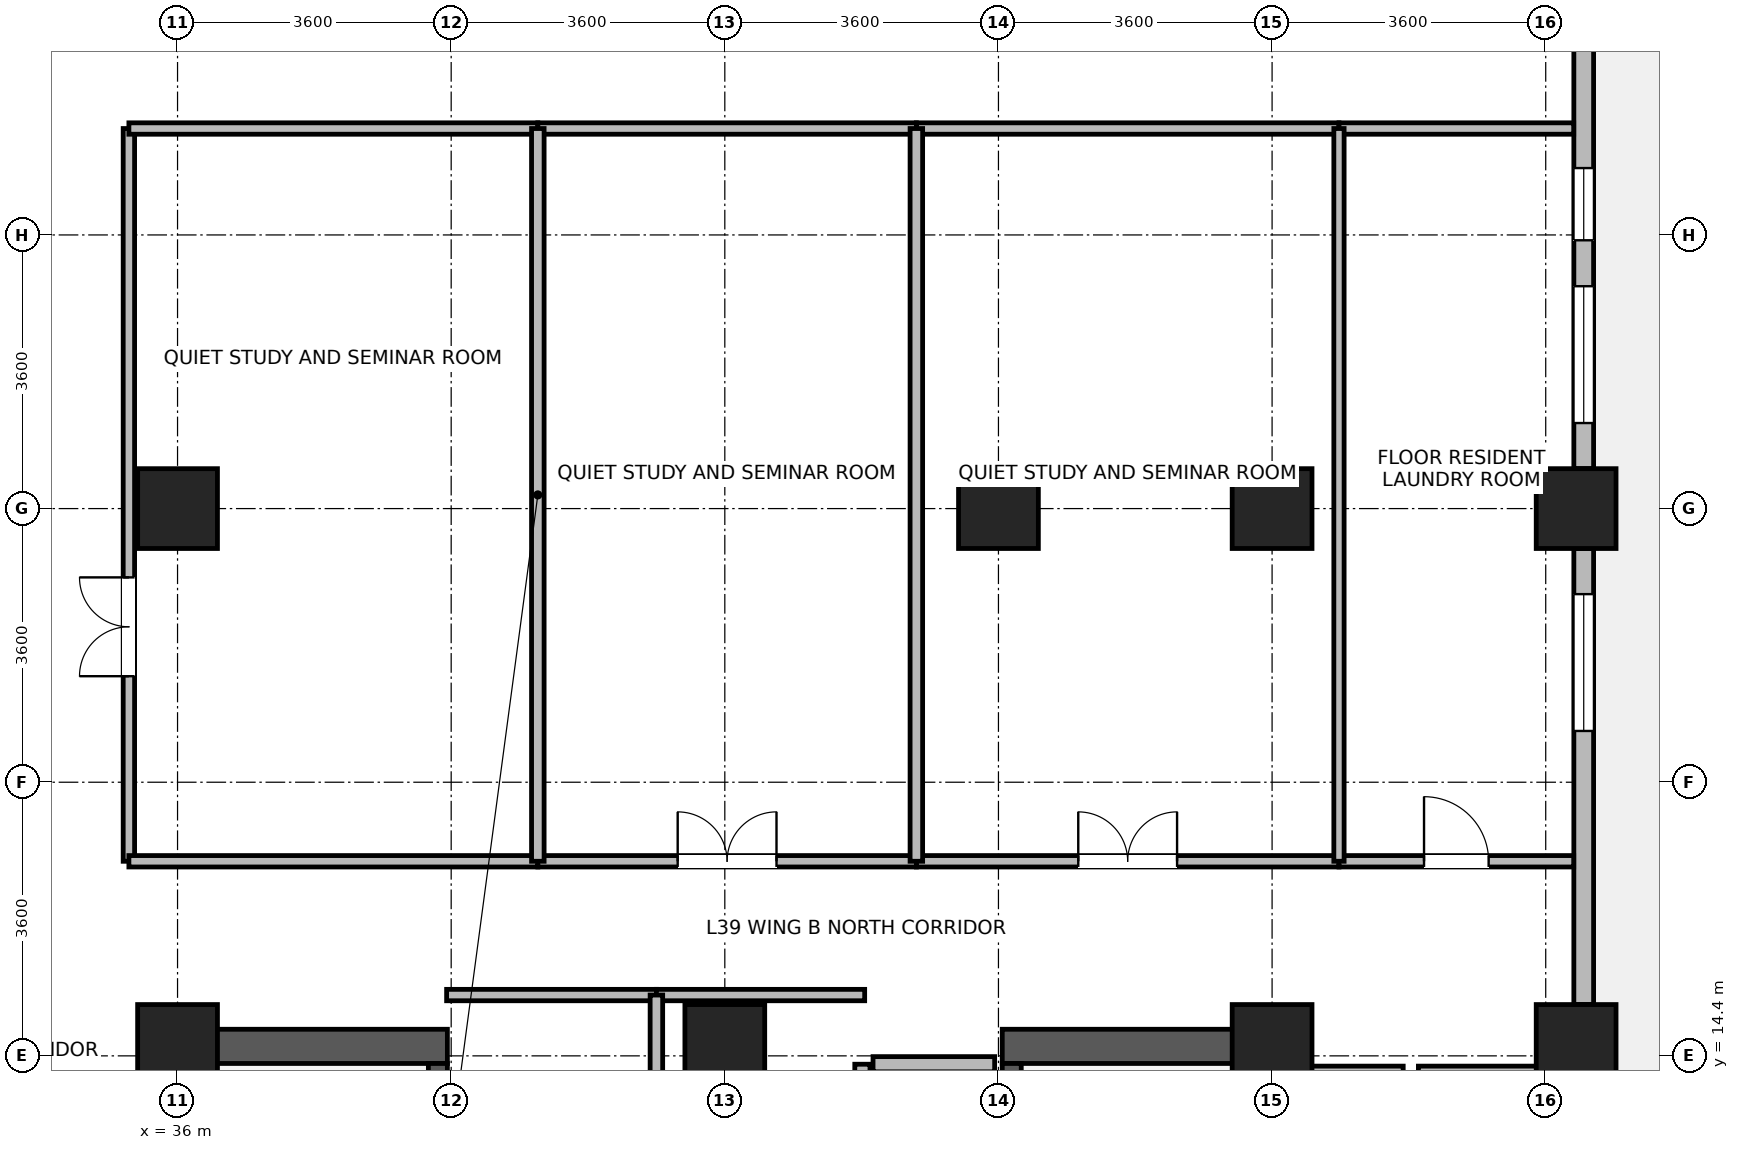
"""IFC4 building model, lengths in metres.
Left out: names, types, materials, properties, quantities, classifications, styles, units other than length and angle.
Written with IfcOpenShell. Run it as: python <this file> out.ifc"""

import sys

from ifc_helpers import new_model, si_unit, direction, frame, frame_2d, origin, origin_2d, place, context, subcontext, project, spatial, rectangle, extrude, source, transform, mapped, element, fill, save


model = new_model("IFC4")
c1 = context("Model", 3, precision=1e-05, world=origin(), true_north=direction((0.0, 1.0)))
c2 = subcontext(c1, "Body", "Model", "MODEL_VIEW")
j1 = project(units=[si_unit("LENGTHUNIT", "METRE"), si_unit("PLANEANGLEUNIT", "RADIAN")], contexts=[c1])
p1 = place(None, origin())
s1 = spatial("IfcSite", under=j1, at=p1, CompositionType="ELEMENT")
p2 = place(p1, origin())
s2 = spatial("IfcBuilding", under=s1, at=p2, CompositionType="ELEMENT")
p3 = place(p2, frame((0.0, 0.0, 155.0)))
s3 = spatial("IfcBuildingStorey", under=s2, at=p3, CompositionType="ELEMENT", Elevation=155.0)
for number, where, z_axis, x_axis in (
    (1, (36.125, 6.85, 0.0), (0.0, 0.0, 1.0), (0.0, 1.0, 0.0)),
    (2, (50.275, 6.85, 0.0), (0.0, 0.0, 1.0), (0.0, 1.0, 0.0)),
):
    element("IfcWall", number, at=place(p3, frame(where, z_axis=z_axis, x_axis=x_axis)), inside=s3, PredefinedType="SHEAR", context=c2, shape_type="SweptSolid", body=[
        extrude(rectangle(XDim=7.9, YDim=0.45, at=frame_2d((3.95, 0.0))), origin(), (0.0, 0.0, 1.0), 3.46),
    ])
for number, where, z_axis, x_axis in (
    (3, (36.35, 14.525, 0.0), (0.0, 0.0, 1.0), (1.0, 0.0, 0.0)),
    (4, (46.85, 14.525, 0.0), (0.0, 0.0, 1.0), (1.0, 0.0, 0.0)),
):
    element("IfcWall", number, at=place(p3, frame(where, z_axis=z_axis, x_axis=x_axis)), inside=s3, PredefinedType="SHEAR", context=c2, shape_type="SweptSolid", body=[
        extrude(rectangle(XDim=3.2, YDim=0.45, at=frame_2d((1.6, 0.0))), origin(), (0.0, 0.0, 1.0), 3.46),
    ])
p4 = place(p3, frame((39.425, 7.3, 0.0), z_axis=(0.0, 0.0, 1.0), x_axis=(0.0, 1.0, 0.0)))
e5 = element("IfcWall", 5, at=p4, inside=s3, PredefinedType="SHEAR", context=c2, shape_type="SweptSolid", body=[
    extrude(rectangle(XDim=7.0, YDim=0.25, at=frame_2d((3.5, 0.0))), origin(), (0.0, 0.0, 1.0), 3.46),
])
p5 = place(p4, frame((0.15, 0.0, 0.0)))
e6 = element("IfcOpeningElement", 6, at=p5, cuts=e5, PredefinedType="OPENING", context=c2, shape_type="SweptSolid", body=[
    extrude(rectangle(XDim=1.1, YDim=2.08, at=frame_2d((0.55, 1.04))), frame((0.0, 0.135, 0.0), z_axis=(0.0, -1.0, 0.0), x_axis=(1.0, 0.0, 0.0)), (0.0, 0.0, 1.0), 0.27),
])
p6 = place(p3, frame((46.975, 7.3, 0.0), z_axis=(0.0, 0.0, 1.0), x_axis=(0.0, 1.0, 0.0)))
e7 = element("IfcWall", 7, at=p6, inside=s3, PredefinedType="SHEAR", context=c2, shape_type="SweptSolid", body=[
    extrude(rectangle(XDim=7.0, YDim=0.25, at=frame_2d((3.5, 0.0))), origin(), (0.0, 0.0, 1.0), 3.46),
])
p7 = place(p6, frame((0.15, 0.0, 0.0)))
e8 = element("IfcOpeningElement", 8, at=p7, cuts=e7, PredefinedType="OPENING", context=c2, shape_type="SweptSolid", body=[
    extrude(rectangle(XDim=1.1, YDim=2.08, at=frame_2d((0.55, 1.04))), frame((0.0, 0.135, 0.0), z_axis=(0.0, -1.0, 0.0), x_axis=(1.0, 0.0, 0.0)), (0.0, 0.0, 1.0), 0.27),
])
m1 = source(origin(), c2, "Body", "SweptSolid", [
    extrude(rectangle(XDim=1.05, YDim=1.05, at=origin_2d()), origin(), (0.0, 0.0, 1.0), 3.7),
])
for number, where, z_axis, x_axis in (
    (9, (36.0, 21.6, 0.0), (0.0, 0.0, 1.0), (1.0, 0.0, 0.0)),
    (10, (46.8, 21.6, 0.0), (0.0, 0.0, 1.0), (1.0, 0.0, 0.0)),
    (11, (36.0, 14.55, 0.0), (0.0, 0.0, 1.0), (1.0, 0.0, 0.0)),
    (12, (43.2, 14.55, 0.0), (0.0, 0.0, 1.0), (1.0, 0.0, 0.0)),
    (13, (50.4, 14.55, 0.0), (0.0, 0.0, 1.0), (1.0, 0.0, 0.0)),
    (14, (50.4, 21.6, 0.0), (0.0, 0.0, 1.0), (1.0, 0.0, 0.0)),
    (15, (54.4, 14.55, 0.0), (0.0, 0.0, 1.0), (1.0, 0.0, 0.0)),
    (16, (54.4, 21.6, 0.0), (0.0, 0.0, 1.0), (1.0, 0.0, 0.0)),
):
    element("IfcColumn", number, at=place(p3, frame(where, z_axis=z_axis, x_axis=x_axis)), inside=s3, PredefinedType="COLUMN", context=c2, shape_type="MappedRepresentation", body=[
        mapped(m1, transform((0.0, 0.0, 0.0), x_axis=(1.0, 0.0, 0.0), y_axis=(0.0, 1.0, 0.0), z_axis=(0.0, 0.0, 1.0), scale=1.0)),
    ])
p8 = place(p3, frame((54.5, 21.074, 0.0), z_axis=(0.0, 0.0, 1.0), x_axis=(0.0, -1.0, 0.0)))
e17 = element("IfcWall", 17, at=p8, inside=s3, PredefinedType="STANDARD", context=c2, shape_type="SweptSolid", body=[
    extrude(rectangle(XDim=5.998, YDim=0.26, at=frame_2d((2.999, 0.0))), origin(), (0.0, 0.0, 1.0), 2.99),
])
p9 = place(p8, frame((0.6, 0.0, 0.85)))
e18 = element("IfcOpeningElement", 18, at=p9, cuts=e17, PredefinedType="OPENING", context=c2, shape_type="SweptSolid", body=[
    extrude(rectangle(XDim=1.8, YDim=1.85, at=frame_2d((0.9, 0.925))), frame((0.0, 0.14, 0.0), z_axis=(0.0, -1.0, 0.0), x_axis=(1.0, 0.0, 0.0)), (0.0, 0.0, 1.0), 0.28),
])
p10 = place(p3, frame((54.5, 28.124, 0.0), z_axis=(0.0, 0.0, 1.0), x_axis=(0.0, -1.0, 0.0)))
e19 = element("IfcWall", 19, at=p10, inside=s3, PredefinedType="STANDARD", context=c2, shape_type="SweptSolid", body=[
    extrude(rectangle(XDim=5.998, YDim=0.26, at=frame_2d((2.999, 0.0))), origin(), (0.0, 0.0, 1.0), 2.99),
])
p11 = place(p10, frame((3.598, 0.0, 0.85)))
e20 = element("IfcOpeningElement", 20, at=p11, cuts=e19, PredefinedType="OPENING", context=c2, shape_type="SweptSolid", body=[
    extrude(rectangle(XDim=1.8, YDim=1.85, at=frame_2d((0.9, 0.925))), frame((0.0, 0.14, 0.0), z_axis=(0.0, -1.0, 0.0), x_axis=(1.0, 0.0, 0.0)), (0.0, 0.0, 1.0), 0.28),
])
p12 = place(p10, frame((2.044, 0.0, 0.85)))
e21 = element("IfcOpeningElement", 21, at=p12, cuts=e19, PredefinedType="OPENING", context=c2, shape_type="SweptSolid", body=[
    extrude(rectangle(XDim=0.95, YDim=1.75, at=frame_2d((0.475, 0.875))), frame((0.0, 0.14, 0.0), z_axis=(0.0, -1.0, 0.0), x_axis=(1.0, 0.0, 0.0)), (0.0, 0.0, 1.0), 0.28),
])
p13 = place(p3, frame((50.475, 14.165, 0.0), z_axis=(0.0, 0.0, 1.0), x_axis=(1.0, 0.0, 0.0)))
e22 = element("IfcWall", 22, at=p13, inside=s3, PredefinedType="PARTITIONING", context=c2, shape_type="SweptSolid", body=[
    extrude(rectangle(XDim=1.65, YDim=0.2, at=frame_2d((0.825, 0.0))), origin(), (0.0, 0.0, 1.0), 3.44),
])
p14 = place(p3, frame((52.325, 14.165, 0.0), z_axis=(0.0, 0.0, 1.0), x_axis=(1.0, 0.0, 0.0)))
e23 = element("IfcWall", 23, at=p14, inside=s3, PredefinedType="PARTITIONING", context=c2, shape_type="SweptSolid", body=[
    extrude(rectangle(XDim=1.65, YDim=0.2, at=frame_2d((0.825, 0.0))), origin(), (0.0, 0.0, 1.0), 3.44),
])
p15 = place(p3, frame((45.15, 14.29, 0.0), z_axis=(0.0, 0.0, 1.0), x_axis=(1.0, 0.0, 0.0)))
e24 = element("IfcWall", 24, at=p15, inside=s3, PredefinedType="PARTITIONING", context=c2, shape_type="SweptSolid", body=[
    extrude(rectangle(XDim=1.6, YDim=0.2, at=frame_2d((0.8, 0.0))), origin(), (0.0, 0.0, 1.0), 2.44),
])
p16 = place(p3, frame((45.01, 11.61, 0.0), z_axis=(0.0, 0.0, 1.0), x_axis=(0.0, 1.0, 0.0)))
e25 = element("IfcWall", 25, at=p16, inside=s3, PredefinedType="PARTITIONING", context=c2, shape_type="SweptSolid", body=[
    extrude(rectangle(XDim=2.68, YDim=0.2, at=frame_2d((1.34, 0.0))), origin(), (0.0, 0.0, 1.0), 3.44),
])
p17 = place(p3, frame((35.36, 16.96, 0.0), z_axis=(0.0, 0.0, 1.0), x_axis=(0.0, 1.0, 0.0)))
e26 = element("IfcWall", 26, at=p17, inside=s3, PredefinedType="PARTITIONING", context=c2, shape_type="SweptSolid", body=[
    extrude(rectangle(XDim=9.64, YDim=0.15, at=frame_2d((4.82, 0.0))), origin(), (0.0, 0.0, 1.0), 3.44),
])
p18 = place(p17, frame((2.435, 0.0, 0.0)))
e27 = element("IfcOpeningElement", 27, at=p18, cuts=e26, PredefinedType="OPENING", context=c2, shape_type="SweptSolid", body=[
    extrude(rectangle(XDim=1.3, YDim=2.12, at=frame_2d((0.65, 1.06))), frame((0.0, 0.085, 0.0), z_axis=(0.0, -1.0, 0.0), x_axis=(1.0, 0.0, 0.0)), (0.0, 0.0, 1.0), 0.17),
])
p19 = place(p3, frame((45.72, 16.96, 0.0), z_axis=(0.0, 0.0, 1.0), x_axis=(1.0, 0.0, 0.0)))
e28 = element("IfcWall", 28, at=p19, inside=s3, PredefinedType="PARTITIONING", context=c2, shape_type="SweptSolid", body=[
    extrude(rectangle(XDim=5.56, YDim=0.15, at=frame_2d((2.78, 0.0))), origin(), (0.0, 0.0, 1.0), 3.44),
])
p20 = place(p19, frame((2.13, 0.0, 0.0)))
e29 = element("IfcOpeningElement", 29, at=p20, cuts=e28, PredefinedType="OPENING", context=c2, shape_type="SweptSolid", body=[
    extrude(rectangle(XDim=1.3, YDim=2.12, at=frame_2d((0.65, 1.06))), frame((0.0, 0.085, 0.0), z_axis=(0.0, -1.0, 0.0), x_axis=(1.0, 0.0, 0.0)), (0.0, 0.0, 1.0), 0.17),
])
p21 = place(p3, frame((45.72, 26.6, 0.0), z_axis=(0.0, 0.0, 1.0), x_axis=(1.0, 0.0, 0.0)))
e30 = element("IfcWall", 30, at=p21, inside=s3, PredefinedType="PARTITIONING", context=c2, shape_type="SweptSolid", body=[
    extrude(rectangle(XDim=5.56, YDim=0.15, at=frame_2d((2.78, 0.0))), origin(), (0.0, 0.0, 1.0), 3.44),
])
for number, where, z_axis, x_axis in (
    (31, (35.36, 16.96, 0.0), (0.0, 0.0, 1.0), (1.0, 0.0, 0.0)),
    (32, (35.36, 26.6, 0.0), (0.0, 0.0, 1.0), (1.0, 0.0, 0.0)),
):
    element("IfcWall", number, at=place(p3, frame(where, z_axis=z_axis, x_axis=x_axis)), inside=s3, PredefinedType="PARTITIONING", context=c2, shape_type="SweptSolid", body=[
        extrude(rectangle(XDim=5.38, YDim=0.15, at=frame_2d((2.69, 0.0))), origin(), (0.0, 0.0, 1.0), 3.44),
    ])
p22 = place(p3, frame((40.74, 16.96, 0.0), z_axis=(0.0, 0.0, 1.0), x_axis=(1.0, 0.0, 0.0)))
e33 = element("IfcWall", 33, at=p22, inside=s3, PredefinedType="PARTITIONING", context=c2, shape_type="SweptSolid", body=[
    extrude(rectangle(XDim=4.98, YDim=0.15, at=frame_2d((2.49, 0.0))), origin(), (0.0, 0.0, 1.0), 3.44),
])
p23 = place(p22, frame((1.84, 0.0, 0.0)))
e34 = element("IfcOpeningElement", 34, at=p23, cuts=e33, PredefinedType="OPENING", context=c2, shape_type="SweptSolid", body=[
    extrude(rectangle(XDim=1.3, YDim=2.12, at=frame_2d((0.65, 1.06))), frame((0.0, 0.085, 0.0), z_axis=(0.0, -1.0, 0.0), x_axis=(1.0, 0.0, 0.0)), (0.0, 0.0, 1.0), 0.17),
])
p24 = place(p3, frame((40.74, 26.6, 0.0), z_axis=(0.0, 0.0, 1.0), x_axis=(1.0, 0.0, 0.0)))
e35 = element("IfcWall", 35, at=p24, inside=s3, PredefinedType="PARTITIONING", context=c2, shape_type="SweptSolid", body=[
    extrude(rectangle(XDim=4.98, YDim=0.15, at=frame_2d((2.49, 0.0))), origin(), (0.0, 0.0, 1.0), 3.44),
])
p25 = place(p3, frame((51.28, 16.96, 0.0), z_axis=(0.0, 0.0, 1.0), x_axis=(1.0, 0.0, 0.0)))
e36 = element("IfcWall", 36, at=p25, inside=s3, PredefinedType="PARTITIONING", context=c2, shape_type="SweptSolid", body=[
    extrude(rectangle(XDim=3.088, YDim=0.15, at=frame_2d((1.544, 0.0))), origin(), (0.0, 0.0, 1.0), 3.44),
])
p26 = place(p25, frame((1.119, 0.0, 0.0)))
e37 = element("IfcOpeningElement", 37, at=p26, cuts=e36, PredefinedType="OPENING", context=c2, shape_type="SweptSolid", body=[
    extrude(rectangle(XDim=0.85, YDim=2.04, at=frame_2d((0.425, 1.02))), frame((0.0, 0.085, 0.0), z_axis=(0.0, -1.0, 0.0), x_axis=(1.0, 0.0, 0.0)), (0.0, 0.0, 1.0), 0.17),
])
p27 = place(p3, frame((51.28, 26.6, 0.0), z_axis=(0.0, 0.0, 1.0), x_axis=(1.0, 0.0, 0.0)))
e38 = element("IfcWall", 38, at=p27, inside=s3, PredefinedType="PARTITIONING", context=c2, shape_type="SweptSolid", body=[
    extrude(rectangle(XDim=3.088, YDim=0.15, at=frame_2d((1.544, 0.0))), origin(), (0.0, 0.0, 1.0), 3.44),
])
p28 = place(p3, frame((39.54, 15.2, 0.0), z_axis=(0.0, 0.0, 1.0), x_axis=(1.0, 0.0, 0.0)))
e39 = element("IfcWall", 39, at=p28, inside=s3, PredefinedType="PARTITIONING", context=c2, shape_type="SweptSolid", body=[
    extrude(rectangle(XDim=2.76, YDim=0.15, at=frame_2d((1.38, 0.0))), origin(), (0.0, 0.0, 1.0), 3.44),
])
p29 = place(p3, frame((42.3, 15.2, 0.0), z_axis=(0.0, 0.0, 1.0), x_axis=(1.0, 0.0, 0.0)))
e40 = element("IfcWall", 40, at=p29, inside=s3, PredefinedType="PARTITIONING", context=c2, shape_type="SweptSolid", body=[
    extrude(rectangle(XDim=2.74, YDim=0.15, at=frame_2d((1.37, 0.0))), origin(), (0.0, 0.0, 1.0), 3.44),
])
for number, where, z_axis, x_axis in (
    (41, (40.74, 16.96, 0.0), (0.0, 0.0, 1.0), (0.0, 1.0, 0.0)),
    (42, (45.72, 16.96, 0.0), (0.0, 0.0, 1.0), (0.0, 1.0, 0.0)),
):
    element("IfcWall", number, at=place(p3, frame(where, z_axis=z_axis, x_axis=x_axis)), inside=s3, PredefinedType="PARTITIONING", context=c2, shape_type="SweptSolid", body=[
        extrude(rectangle(XDim=9.64, YDim=0.165, at=frame_2d((4.82, 0.0))), origin(), (0.0, 0.0, 1.0), 3.44),
    ])
p30 = place(p3, frame((51.28, 16.96, 0.0), z_axis=(0.0, 0.0, 1.0), x_axis=(0.0, 1.0, 0.0)))
e43 = element("IfcWall", 43, at=p30, inside=s3, PredefinedType="PARTITIONING", context=c2, shape_type="SweptSolid", body=[
    extrude(rectangle(XDim=9.64, YDim=0.135, at=frame_2d((4.82, 0.0))), origin(), (0.0, 0.0, 1.0), 3.44),
])
p31 = place(p3, frame((42.3, 11.64, 0.0), z_axis=(0.0, 0.0, 1.0), x_axis=(0.0, 1.0, 0.0)))
e44 = element("IfcWall", 44, at=p31, inside=s3, PredefinedType="PARTITIONING", context=c2, shape_type="SweptSolid", body=[
    extrude(rectangle(XDim=3.56, YDim=0.165, at=frame_2d((1.78, 0.0))), origin(), (0.0, 0.0, 1.0), 3.44),
])
p32 = place(p9, origin())
e45 = element("IfcWindow", 45, at=p32, inside=s3, PartitioningType="SINGLE_PANEL", PredefinedType="WINDOW", context=c2, shape_type="SweptSolid", body=[
    extrude(rectangle(XDim=1.8, YDim=1.85, at=frame_2d((0.9, 0.925))), frame((0.0, 0.03, 0.0), z_axis=(0.0, -1.0, 0.0), x_axis=(1.0, 0.0, 0.0)), (0.0, 0.0, 1.0), 0.06),
])
fill(e18, e45)
p33 = place(p11, origin())
e46 = element("IfcWindow", 46, at=p33, inside=s3, PartitioningType="SINGLE_PANEL", PredefinedType="WINDOW", context=c2, shape_type="SweptSolid", body=[
    extrude(rectangle(XDim=1.8, YDim=1.85, at=frame_2d((0.9, 0.925))), frame((0.0, 0.03, 0.0), z_axis=(0.0, -1.0, 0.0), x_axis=(1.0, 0.0, 0.0)), (0.0, 0.0, 1.0), 0.06),
])
fill(e20, e46)
p34 = place(p12, origin())
e47 = element("IfcWindow", 47, at=p34, inside=s3, PartitioningType="SINGLE_PANEL", PredefinedType="WINDOW", context=c2, shape_type="SweptSolid", body=[
    extrude(rectangle(XDim=0.95, YDim=1.75, at=frame_2d((0.475, 0.875))), frame((0.0, 0.03, 0.0), z_axis=(0.0, -1.0, 0.0), x_axis=(1.0, 0.0, 0.0)), (0.0, 0.0, 1.0), 0.06),
])
fill(e21, e47)
p35 = place(p18, origin())
e48 = element("IfcDoor", 48, at=p35, inside=s3, OperationType="DOUBLE_DOOR_SINGLE_SWING", PredefinedType="DOOR", context=c2, shape_type="SweptSolid", body=[
    extrude(rectangle(XDim=1.3, YDim=2.12, at=frame_2d((0.65, 1.06))), frame((0.0, 0.025, 0.0), z_axis=(0.0, -1.0, 0.0), x_axis=(1.0, 0.0, 0.0)), (0.0, 0.0, 1.0), 0.05),
])
fill(e27, e48)
p36 = place(p20, origin())
e49 = element("IfcDoor", 49, at=p36, inside=s3, OperationType="DOUBLE_DOOR_SINGLE_SWING", PredefinedType="DOOR", context=c2, shape_type="SweptSolid", body=[
    extrude(rectangle(XDim=1.3, YDim=2.12, at=frame_2d((0.65, 1.06))), frame((0.0, 0.025, 0.0), z_axis=(0.0, -1.0, 0.0), x_axis=(1.0, 0.0, 0.0)), (0.0, 0.0, 1.0), 0.05),
])
fill(e29, e49)
p37 = place(p23, origin())
e50 = element("IfcDoor", 50, at=p37, inside=s3, OperationType="DOUBLE_DOOR_SINGLE_SWING", PredefinedType="DOOR", context=c2, shape_type="SweptSolid", body=[
    extrude(rectangle(XDim=1.3, YDim=2.12, at=frame_2d((0.65, 1.06))), frame((0.0, 0.025, 0.0), z_axis=(0.0, -1.0, 0.0), x_axis=(1.0, 0.0, 0.0)), (0.0, 0.0, 1.0), 0.05),
])
fill(e34, e50)
p38 = place(p26, origin())
e51 = element("IfcDoor", 51, at=p38, inside=s3, OperationType="SINGLE_SWING_LEFT", PredefinedType="DOOR", context=c2, shape_type="SweptSolid", body=[
    extrude(rectangle(XDim=0.85, YDim=2.04, at=frame_2d((0.425, 1.02))), frame((0.0, 0.025, 0.0), z_axis=(0.0, -1.0, 0.0), x_axis=(1.0, 0.0, 0.0)), (0.0, 0.0, 1.0), 0.05),
])
fill(e37, e51)
save(model, sys.argv[1])
